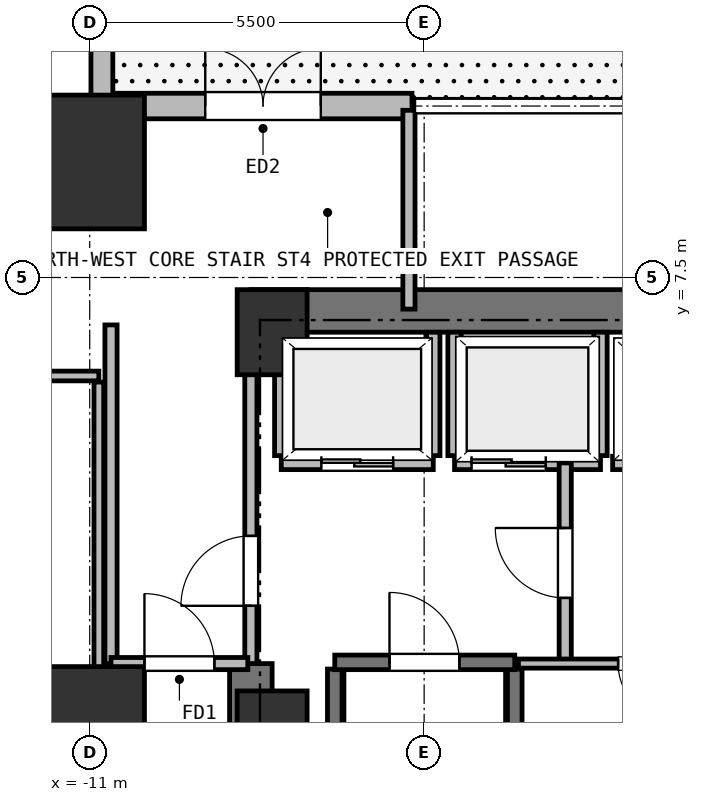
"""IFC4 building model, lengths in metres.
Left out: names, types, materials, properties, quantities, classifications, styles, units other than length and angle.
Written with IfcOpenShell. Run it as: python <this file> out.ifc"""

import sys

from ifc_helpers import new_model, si_unit, direction, frame, frame_2d, origin, origin_2d, place, context, subcontext, project, spatial, rectangle, extrude, element, fill, save


model = new_model("IFC4")
c1 = context("Model", 3, precision=1e-05, world=origin(), true_north=direction((0.0, 1.0)))
c2 = subcontext(c1, "Body", "Model", "MODEL_VIEW")
j1 = project(units=[si_unit("LENGTHUNIT", "METRE"), si_unit("PLANEANGLEUNIT", "RADIAN")], contexts=[c1])
p1 = place(None, origin())
s1 = spatial("IfcSite", under=j1, at=p1, CompositionType="ELEMENT")
p2 = place(p1, origin())
s2 = spatial("IfcBuilding", under=s1, at=p2, CompositionType="ELEMENT")
p3 = place(p2, origin())
s3 = spatial("IfcBuildingStorey", under=s2, at=p3, CompositionType="ELEMENT", Elevation=0.0)
for number, where, z_axis, x_axis in (
    (1, (-8.0, 6.6, 0.0), (0.0, 0.0, 1.0), (1.0, 0.0, 0.0)),
    (2, (-8.0, 0.0, 0.0), (0.0, 0.0, 1.0), (1.0, 0.0, 0.0)),
):
    element("IfcColumn", number, at=place(p3, frame(where, z_axis=z_axis, x_axis=x_axis)), inside=s3, PredefinedType="COLUMN", context=c2, shape_type="SweptSolid", body=[
        extrude(rectangle(XDim=1.15, YDim=1.4, at=origin_2d()), origin(), (0.0, 0.0, 1.0), 6.0),
    ])
p4 = place(p3, frame((-8.35, 6.95, 0.0), z_axis=(0.0, 0.0, 1.0), x_axis=(1.0, 0.0, 0.0)))
e3 = element("IfcWall", 3, at=p4, inside=s3, PredefinedType="SHEAR", context=c2, shape_type="SweptSolid", body=[
    extrude(rectangle(XDim=16.7, YDim=0.7, at=frame_2d((8.35, 0.0))), origin(), (0.0, 0.0, 1.0), 5.72),
])
p5 = place(p3, frame((-8.35, -6.95, 0.0), z_axis=(0.0, 0.0, 1.0), x_axis=(0.0, 1.0, 0.0)))
e4 = element("IfcWall", 4, at=p5, inside=s3, PredefinedType="SHEAR", context=c2, shape_type="SweptSolid", body=[
    extrude(rectangle(XDim=8.1, YDim=0.7, at=frame_2d((4.05, 0.0))), origin(), (0.0, 0.0, 1.0), 5.72),
])
for number, where, z_axis, x_axis in (
    (5, (-11.0, 0.0, 0.0), (0.0, 0.0, 1.0), (1.0, 0.0, 0.0)),
    (6, (-11.0, 9.4, 0.0), (0.0, 0.0, 1.0), (1.0, 0.0, 0.0)),
):
    element("IfcColumn", number, at=place(p3, frame(where, z_axis=z_axis, x_axis=x_axis)), inside=s3, PredefinedType="COLUMN", context=c2, shape_type="SweptSolid", body=[
        extrude(rectangle(XDim=1.8, YDim=2.2, at=origin_2d()), origin(), (0.0, 0.0, 1.0), 6.0),
    ])
p6 = place(p3, frame((-10.6, 10.32, 0.0), z_axis=(0.0, 0.0, 1.0), x_axis=(1.0, 0.0, 0.0)))
e7 = element("IfcWall", 7, at=p6, inside=s3, PredefinedType="SOLIDWALL", context=c2, shape_type="SweptSolid", body=[
    extrude(rectangle(XDim=4.9, YDim=0.42, at=frame_2d((2.45, 0.0))), origin(), (0.0, 0.0, 1.0), 5.72),
])
p7 = place(p6, frame((1.5, 0.0, 0.0)))
e8 = element("IfcOpeningElement", 8, at=p7, cuts=e7, PredefinedType="OPENING", context=c2, shape_type="SweptSolid", body=[
    extrude(rectangle(XDim=1.9, YDim=2.35, at=frame_2d((0.95, 1.175))), frame((0.0, 0.22, 0.0), z_axis=(0.0, -1.0, 0.0), x_axis=(1.0, 0.0, 0.0)), (0.0, 0.0, 1.0), 0.44),
])
p8 = place(p3, frame((-10.8, 10.32, 0.0), z_axis=(0.0, 0.0, 1.0), x_axis=(0.0, 1.0, 0.0)))
e9 = element("IfcWall", 9, at=p8, inside=s3, PredefinedType="SOLIDWALL", context=c2, shape_type="SweptSolid", body=[
    extrude(rectangle(XDim=10.97, YDim=0.36, at=frame_2d((5.485, 0.0))), origin(), (0.0, 0.0, 1.0), 5.1),
])
for number, where, z_axis, x_axis in (
    (10, (-6.97, -6.16, 0.0), (0.0, 0.0, 1.0), (0.0, 1.0, 0.0)),
    (11, (-4.01, -6.16, 0.0), (0.0, 0.0, 1.0), (0.0, 1.0, 0.0)),
):
    element("IfcWall", number, at=place(p3, frame(where, z_axis=z_axis, x_axis=x_axis)), inside=s3, PredefinedType="SHEAR", context=c2, shape_type="SweptSolid", body=[
        extrude(rectangle(XDim=7.22, YDim=0.24, at=frame_2d((3.61, 0.0))), origin(), (0.0, 0.0, 1.0), 5.72),
    ])
p9 = place(p3, frame((-6.97, 1.17, 0.0), z_axis=(0.0, 0.0, 1.0), x_axis=(1.0, 0.0, 0.0)))
e12 = element("IfcWall", 12, at=p9, inside=s3, PredefinedType="SHEAR", context=c2, shape_type="SweptSolid", body=[
    extrude(rectangle(XDim=2.96, YDim=0.24, at=frame_2d((1.48, 0.0))), origin(), (0.0, 0.0, 1.0), 5.72),
])
p10 = place(p9, frame((0.9, 0.0, 0.0)))
e13 = element("IfcOpeningElement", 13, at=p10, cuts=e12, PredefinedType="OPENING", context=c2, shape_type="SweptSolid", body=[
    extrude(rectangle(XDim=1.15, YDim=2.15, at=frame_2d((0.575, 1.075))), frame((0.0, 0.13, 0.0), z_axis=(0.0, -1.0, 0.0), x_axis=(1.0, 0.0, 0.0)), (0.0, 0.0, 1.0), 0.26),
])
p11 = place(p3, frame((-7.85, 4.45, 0.0), z_axis=(0.0, 0.0, 1.0), x_axis=(1.0, 0.0, 0.0)))
e14 = element("IfcWall", 14, at=p11, inside=s3, PredefinedType="PARTITIONING", context=c2, shape_type="SweptSolid", body=[
    extrude(rectangle(XDim=2.5, YDim=0.22, at=frame_2d((1.25, 0.0))), origin(), (0.0, 0.0, 1.0), 5.72),
])
p12 = place(p11, frame((0.66, 0.0, 0.0)))
e15 = element("IfcOpeningElement", 15, at=p12, cuts=e14, PredefinedType="OPENING", context=c2, shape_type="SweptSolid", body=[
    extrude(rectangle(XDim=1.18, YDim=2.15, at=frame_2d((0.59, 1.075))), frame((0.0, 0.12, 0.0), z_axis=(0.0, -1.0, 0.0), x_axis=(1.0, 0.0, 0.0)), (0.0, 0.0, 1.0), 0.24),
])
p13 = place(p3, frame((-7.85, 4.57, 0.0), z_axis=(0.0, 0.0, 1.0), x_axis=(0.0, 1.0, 0.0)))
e16 = element("IfcWall", 16, at=p13, inside=s3, PredefinedType="PARTITIONING", context=c2, shape_type="SweptSolid", body=[
    extrude(rectangle(XDim=2.03, YDim=0.22, at=frame_2d((1.015, 0.0))), origin(), (0.0, 0.0, 1.0), 5.3),
])
p14 = place(p3, frame((-5.35, 4.57, 0.0), z_axis=(0.0, 0.0, 1.0), x_axis=(0.0, 1.0, 0.0)))
e17 = element("IfcWall", 17, at=p14, inside=s3, PredefinedType="PARTITIONING", context=c2, shape_type="SweptSolid", body=[
    extrude(rectangle(XDim=2.03, YDim=0.22, at=frame_2d((1.015, 0.0))), origin(), (0.0, 0.0, 1.0), 5.72),
])
p15 = place(p3, frame((-5.0, 4.45, 0.0), z_axis=(0.0, 0.0, 1.0), x_axis=(1.0, 0.0, 0.0)))
e18 = element("IfcWall", 18, at=p15, inside=s3, PredefinedType="PARTITIONING", context=c2, shape_type="SweptSolid", body=[
    extrude(rectangle(XDim=2.4, YDim=0.22, at=frame_2d((1.2, 0.0))), origin(), (0.0, 0.0, 1.0), 5.72),
])
p16 = place(p15, frame((0.28, 0.0, 0.0)))
e19 = element("IfcOpeningElement", 19, at=p16, cuts=e18, PredefinedType="OPENING", context=c2, shape_type="SweptSolid", body=[
    extrude(rectangle(XDim=1.22, YDim=2.15, at=frame_2d((0.61, 1.075))), frame((0.0, 0.12, 0.0), z_axis=(0.0, -1.0, 0.0), x_axis=(1.0, 0.0, 0.0)), (0.0, 0.0, 1.0), 0.24),
])
for number, where, z_axis, x_axis in (
    (20, (-5.0, 4.57, 0.0), (0.0, 0.0, 1.0), (0.0, 1.0, 0.0)),
    (21, (-2.6, 4.57, 0.0), (0.0, 0.0, 1.0), (0.0, 1.0, 0.0)),
):
    element("IfcWall", number, at=place(p3, frame(where, z_axis=z_axis, x_axis=x_axis)), inside=s3, PredefinedType="PARTITIONING", context=c2, shape_type="SweptSolid", body=[
        extrude(rectangle(XDim=2.03, YDim=0.22, at=frame_2d((1.015, 0.0))), origin(), (0.0, 0.0, 1.0), 5.72),
    ])
p17 = place(p3, frame((-2.4, 4.45, 0.0), z_axis=(0.0, 0.0, 1.0), x_axis=(1.0, 0.0, 0.0)))
e22 = element("IfcWall", 22, at=p17, inside=s3, PredefinedType="PARTITIONING", context=c2, shape_type="SweptSolid", body=[
    extrude(rectangle(XDim=2.2, YDim=0.22, at=frame_2d((1.1, 0.0))), origin(), (0.0, 0.0, 1.0), 5.72),
])
p18 = place(p17, frame((0.54, 0.0, 0.0)))
e23 = element("IfcOpeningElement", 23, at=p18, cuts=e22, PredefinedType="OPENING", context=c2, shape_type="SweptSolid", body=[
    extrude(rectangle(XDim=1.12, YDim=2.15, at=frame_2d((0.56, 1.075))), frame((0.0, 0.12, 0.0), z_axis=(0.0, -1.0, 0.0), x_axis=(1.0, 0.0, 0.0)), (0.0, 0.0, 1.0), 0.24),
])
p19 = place(p3, frame((-3.18, 1.15, 0.0), z_axis=(0.0, 0.0, 1.0), x_axis=(0.0, 1.0, 0.0)))
e24 = element("IfcWall", 24, at=p19, inside=s3, PredefinedType="PARTITIONING", context=c2, shape_type="SweptSolid", body=[
    extrude(rectangle(XDim=3.3, YDim=0.2, at=frame_2d((1.65, 0.0))), origin(), (0.0, 0.0, 1.0), 5.72),
])
p20 = place(p19, frame((1.08, 0.0, 0.0)))
e25 = element("IfcOpeningElement", 25, at=p20, cuts=e24, PredefinedType="OPENING", context=c2, shape_type="SweptSolid", body=[
    extrude(rectangle(XDim=1.15, YDim=2.15, at=frame_2d((0.575, 1.075))), frame((0.0, 0.11, 0.0), z_axis=(0.0, -1.0, 0.0), x_axis=(1.0, 0.0, 0.0)), (0.0, 0.0, 1.0), 0.22),
])
p21 = place(p3, frame((-8.35, 1.15, 0.0), z_axis=(0.0, 0.0, 1.0), x_axis=(0.0, 1.0, 0.0)))
e26 = element("IfcWall", 26, at=p21, inside=s3, PredefinedType="PARTITIONING", context=c2, shape_type="SweptSolid", body=[
    extrude(rectangle(XDim=5.4, YDim=0.2, at=frame_2d((2.7, 0.0))), origin(), (0.0, 0.0, 1.0), 5.72),
])
p22 = place(p21, frame((0.95, 0.0, 0.0)))
e27 = element("IfcOpeningElement", 27, at=p22, cuts=e26, PredefinedType="OPENING", context=c2, shape_type="SweptSolid", body=[
    extrude(rectangle(XDim=1.15, YDim=2.15, at=frame_2d((0.575, 1.075))), frame((0.0, 0.11, 0.0), z_axis=(0.0, -1.0, 0.0), x_axis=(1.0, 0.0, 0.0)), (0.0, 0.0, 1.0), 0.22),
])
p23 = place(p3, frame((3.95, 1.15, 0.0), z_axis=(0.0, 0.0, 1.0), x_axis=(-1.0, 0.0, 0.0)))
e28 = element("IfcWall", 28, at=p23, inside=s3, PredefinedType="PARTITIONING", context=c2, shape_type="SweptSolid", body=[
    extrude(rectangle(XDim=7.9, YDim=0.15, at=frame_2d((3.95, 0.0))), origin(), (0.0, 0.0, 1.0), 5.72),
])
p24 = place(p23, frame((5.34, 0.0, 0.0)))
e29 = element("IfcOpeningElement", 29, at=p24, cuts=e28, PredefinedType="OPENING", context=c2, shape_type="SweptSolid", body=[
    extrude(rectangle(XDim=0.92, YDim=2.05, at=frame_2d((0.46, 1.025))), frame((0.0, 0.085, 0.0), z_axis=(0.0, -1.0, 0.0), x_axis=(1.0, 0.0, 0.0)), (0.0, 0.0, 1.0), 0.17),
])
p25 = place(p23, frame((1.84, 0.0, 0.0)))
e30 = element("IfcOpeningElement", 30, at=p25, cuts=e28, PredefinedType="OPENING", context=c2, shape_type="SweptSolid", body=[
    extrude(rectangle(XDim=0.92, YDim=2.05, at=frame_2d((0.46, 1.025))), frame((0.0, 0.085, 0.0), z_axis=(0.0, -1.0, 0.0), x_axis=(1.0, 0.0, 0.0)), (0.0, 0.0, 1.0), 0.17),
])
p26 = place(p3, frame((-10.85, 5.88, 0.0), z_axis=(0.0, 0.0, 1.0), x_axis=(-1.0, 0.0, 0.0)))
e31 = element("IfcWall", 31, at=p26, inside=s3, PredefinedType="PARTITIONING", context=c2, shape_type="SweptSolid", body=[
    extrude(rectangle(XDim=29.55, YDim=0.16, at=frame_2d((14.775, 0.0))), origin(), (0.0, 0.0, 1.0), 5.72),
])
p27 = place(p3, frame((-10.85, -5.78, 0.0), z_axis=(0.0, 0.0, 1.0), x_axis=(0.0, 1.0, 0.0)))
e32 = element("IfcWall", 32, at=p27, inside=s3, PredefinedType="PARTITIONING", context=c2, shape_type="SweptSolid", body=[
    extrude(rectangle(XDim=11.56, YDim=0.16, at=frame_2d((5.78, 0.0))), origin(), (0.0, 0.0, 1.0), 5.1),
])
p28 = place(p27, frame((2.23, 0.0, 0.0)))
e33 = element("IfcOpeningElement", 33, at=p28, cuts=e32, PredefinedType="OPENING", context=c2, shape_type="SweptSolid", body=[
    extrude(rectangle(XDim=1.5, YDim=2.2, at=frame_2d((0.75, 1.1))), frame((0.0, 0.09, 0.0), z_axis=(0.0, -1.0, 0.0), x_axis=(1.0, 0.0, 0.0)), (0.0, 0.0, 1.0), 0.18),
])
p29 = place(p3, frame((-28.5, 8.92, 0.0), z_axis=(0.0, 0.0, 1.0), x_axis=(1.0, 0.0, 0.0)))
e34 = element("IfcWall", 34, at=p29, inside=s3, PredefinedType="PARTITIONING", context=c2, shape_type="SweptSolid", body=[
    extrude(rectangle(XDim=17.45, YDim=0.2, at=frame_2d((8.725, 0.0))), origin(), (0.0, 0.0, 1.0), 5.72),
])
p30 = place(p29, frame((12.1, 0.0, 0.0)))
e35 = element("IfcOpeningElement", 35, at=p30, cuts=e34, PredefinedType="OPENING", context=c2, shape_type="SweptSolid", body=[
    extrude(rectangle(XDim=1.8, YDim=2.2, at=frame_2d((0.9, 1.1))), frame((0.0, 0.11, 0.0), z_axis=(0.0, -1.0, 0.0), x_axis=(1.0, 0.0, 0.0)), (0.0, 0.0, 1.0), 0.22),
])
p31 = place(p3, frame((-5.75, 6.98, 0.0), z_axis=(0.0, 0.0, 1.0), x_axis=(0.0, 1.0, 0.0)))
e36 = element("IfcWall", 36, at=p31, inside=s3, PredefinedType="PARTITIONING", context=c2, shape_type="SweptSolid", body=[
    extrude(rectangle(XDim=3.27, YDim=0.2, at=frame_2d((1.635, 0.0))), origin(), (0.0, 0.0, 1.0), 5.72),
])
p32 = place(p3, frame((-10.65, 10.25, 0.0), z_axis=(0.0, 0.0, 1.0), x_axis=(0.0, -1.0, 0.0)))
e37 = element("IfcWall", 37, at=p32, inside=s3, PredefinedType="PARTITIONING", context=c2, shape_type="SweptSolid", body=[
    extrude(rectangle(XDim=1.37, YDim=0.2, at=frame_2d((0.685, 0.0))), origin(), (0.0, 0.0, 1.0), 5.72),
])
p33 = place(p3, frame((-10.65, 6.72, 0.0), z_axis=(0.0, 0.0, 1.0), x_axis=(0.0, -1.0, 0.0)))
e38 = element("IfcWall", 38, at=p33, inside=s3, PredefinedType="PARTITIONING", context=c2, shape_type="SweptSolid", body=[
    extrude(rectangle(XDim=5.57, YDim=0.2, at=frame_2d((2.785, 0.0))), origin(), (0.0, 0.0, 1.0), 5.72),
])
p34 = place(p3, frame((-10.65, 1.15, 0.0), z_axis=(0.0, 0.0, 1.0), x_axis=(1.0, 0.0, 0.0)))
e39 = element("IfcWall", 39, at=p34, inside=s3, PredefinedType="PARTITIONING", context=c2, shape_type="SweptSolid", body=[
    extrude(rectangle(XDim=2.25, YDim=0.2, at=frame_2d((1.125, 0.0))), origin(), (0.0, 0.0, 1.0), 5.72),
])
p35 = place(p34, frame((0.55, 0.0, 0.0)))
e40 = element("IfcOpeningElement", 40, at=p35, cuts=e39, PredefinedType="OPENING", context=c2, shape_type="SweptSolid", body=[
    extrude(rectangle(XDim=1.15, YDim=2.15, at=frame_2d((0.575, 1.075))), frame((0.0, 0.11, 0.0), z_axis=(0.0, -1.0, 0.0), x_axis=(1.0, 0.0, 0.0)), (0.0, 0.0, 1.0), 0.22),
])
p36 = place(p7, origin())
e41 = element("IfcDoor", 41, at=p36, inside=s3, OperationType="DOUBLE_DOOR_SINGLE_SWING", PredefinedType="DOOR", context=c2, shape_type="SweptSolid", body=[
    extrude(rectangle(XDim=1.9, YDim=2.35, at=frame_2d((0.95, 1.175))), frame((0.0, 0.025, 0.0), z_axis=(0.0, -1.0, 0.0), x_axis=(1.0, 0.0, 0.0)), (0.0, 0.0, 1.0), 0.05),
])
fill(e8, e41)
p37 = place(p10, origin())
e42 = element("IfcDoor", 42, at=p37, inside=s3, OperationType="SINGLE_SWING_LEFT", PredefinedType="DOOR", context=c2, shape_type="SweptSolid", body=[
    extrude(rectangle(XDim=1.15, YDim=2.15, at=frame_2d((0.575, 1.075))), frame((0.0, 0.025, 0.0), z_axis=(0.0, -1.0, 0.0), x_axis=(1.0, 0.0, 0.0)), (0.0, 0.0, 1.0), 0.05),
])
fill(e13, e42)
p38 = place(p12, origin())
e43 = element("IfcDoor", 43, at=p38, inside=s3, OperationType="DOUBLE_DOOR_SLIDING", PredefinedType="DOOR", context=c2, shape_type="SweptSolid", body=[
    extrude(rectangle(XDim=1.18, YDim=2.15, at=frame_2d((0.59, 1.075))), frame((0.0, 0.025, 0.0), z_axis=(0.0, -1.0, 0.0), x_axis=(1.0, 0.0, 0.0)), (0.0, 0.0, 1.0), 0.05),
])
fill(e15, e43)
p39 = place(p16, origin())
e44 = element("IfcDoor", 44, at=p39, inside=s3, OperationType="DOUBLE_DOOR_SLIDING", PredefinedType="DOOR", context=c2, shape_type="SweptSolid", body=[
    extrude(rectangle(XDim=1.22, YDim=2.15, at=frame_2d((0.61, 1.075))), frame((0.0, 0.025, 0.0), z_axis=(0.0, -1.0, 0.0), x_axis=(1.0, 0.0, 0.0)), (0.0, 0.0, 1.0), 0.05),
])
fill(e19, e44)
p40 = place(p20, origin())
e45 = element("IfcDoor", 45, at=p40, inside=s3, OperationType="SINGLE_SWING_RIGHT", PredefinedType="DOOR", context=c2, shape_type="SweptSolid", body=[
    extrude(rectangle(XDim=1.15, YDim=2.15, at=frame_2d((0.575, 1.075))), frame((0.0, 0.025, 0.0), z_axis=(0.0, -1.0, 0.0), x_axis=(1.0, 0.0, 0.0)), (0.0, 0.0, 1.0), 0.05),
])
fill(e25, e45)
p41 = place(p22, origin())
e46 = element("IfcDoor", 46, at=p41, inside=s3, OperationType="SINGLE_SWING_LEFT", PredefinedType="DOOR", context=c2, shape_type="SweptSolid", body=[
    extrude(rectangle(XDim=1.15, YDim=2.15, at=frame_2d((0.575, 1.075))), frame((0.0, 0.025, 0.0), z_axis=(0.0, -1.0, 0.0), x_axis=(1.0, 0.0, 0.0)), (0.0, 0.0, 1.0), 0.05),
])
fill(e27, e46)
p42 = place(p24, origin())
e47 = element("IfcDoor", 47, at=p42, inside=s3, OperationType="SINGLE_SWING_LEFT", PredefinedType="DOOR", context=c2, shape_type="SweptSolid", body=[
    extrude(rectangle(XDim=0.92, YDim=2.05, at=frame_2d((0.46, 1.025))), frame((0.0, 0.025, 0.0), z_axis=(0.0, -1.0, 0.0), x_axis=(1.0, 0.0, 0.0)), (0.0, 0.0, 1.0), 0.05),
])
fill(e29, e47)
p43 = place(p35, origin())
e48 = element("IfcDoor", 48, at=p43, inside=s3, OperationType="SINGLE_SWING_LEFT", PredefinedType="DOOR", context=c2, shape_type="SweptSolid", body=[
    extrude(rectangle(XDim=1.15, YDim=2.15, at=frame_2d((0.575, 1.075))), frame((0.0, 0.025, 0.0), z_axis=(0.0, -1.0, 0.0), x_axis=(1.0, 0.0, 0.0)), (0.0, 0.0, 1.0), 0.05),
])
fill(e40, e48)
save(model, sys.argv[1])
